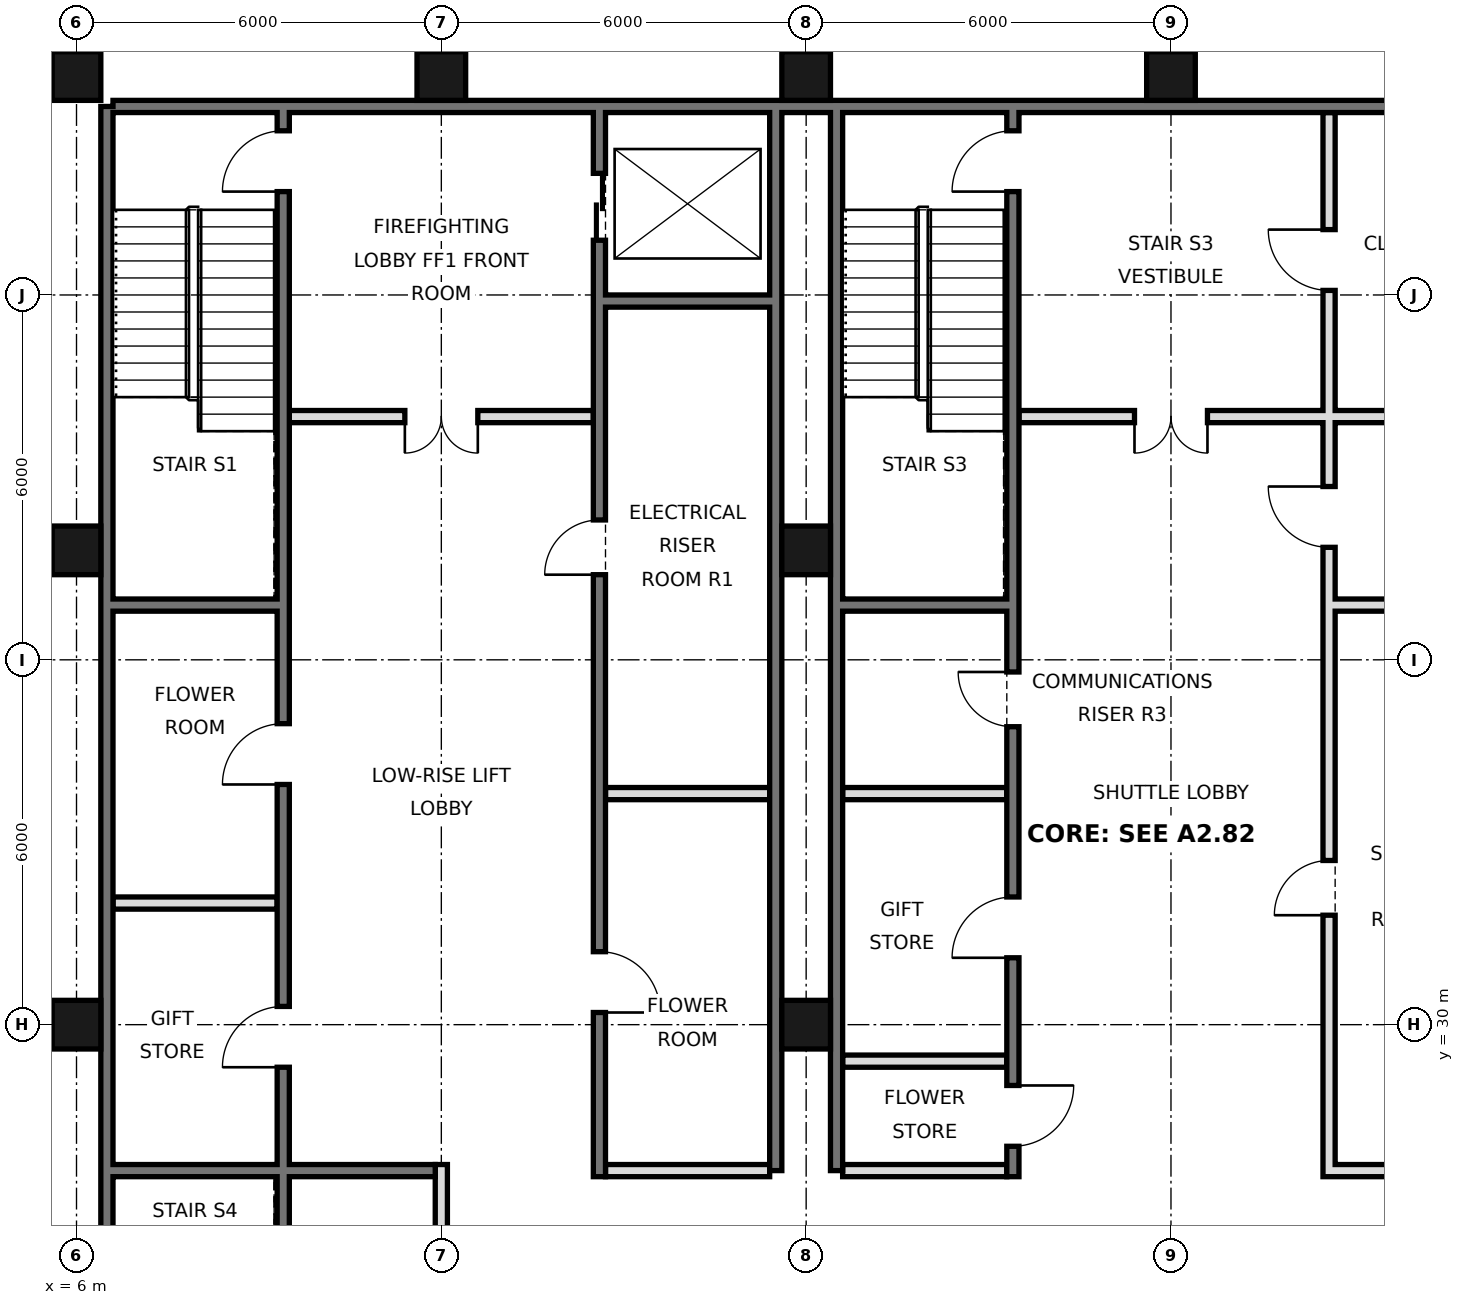
"""IFC4 building model, lengths in metres.
Left out: names, types, materials, properties, quantities, classifications, styles, units other than length and angle.
Written with IfcOpenShell. Run it as: python <this file> out.ifc"""

import sys

from ifc_helpers import new_model, si_unit, direction, frame, frame_2d, origin, origin_2d, place, context, subcontext, project, spatial, rectangle, hollow_rectangle, extrude, element, fill, save


model = new_model("IFC4")
c1 = context("Model", 3, precision=1e-05, world=origin(), true_north=direction((0.0, 1.0)))
c2 = subcontext(c1, "Body", "Model", "MODEL_VIEW")
j1 = project(units=[si_unit("LENGTHUNIT", "METRE"), si_unit("PLANEANGLEUNIT", "RADIAN")], contexts=[c1])
p1 = place(None, origin())
s1 = spatial("IfcSite", under=j1, at=p1, CompositionType="ELEMENT")
p2 = place(p1, origin())
s2 = spatial("IfcBuilding", under=s1, at=p2, CompositionType="ELEMENT")
p3 = place(p2, frame((0.0, 0.0, 326.8)))
s3 = spatial("IfcBuildingStorey", under=s2, at=p3, CompositionType="ELEMENT", Elevation=326.8)
for number, where, z_axis, x_axis in (
    (1, (6.0, 30.0, 0.0), (0.0, 0.0, 1.0), (1.0, 0.0, 0.0)),
    (2, (6.0, 37.8, 0.0), (0.0, 0.0, 1.0), (1.0, 0.0, 0.0)),
    (3, (6.0, 45.6, 0.0), (0.0, 0.0, 1.0), (1.0, 0.0, 0.0)),
    (4, (12.0, 45.6, 0.0), (0.0, 0.0, 1.0), (1.0, 0.0, 0.0)),
    (5, (18.0, 30.0, 0.0), (0.0, 0.0, 1.0), (1.0, 0.0, 0.0)),
    (6, (18.0, 37.8, 0.0), (0.0, 0.0, 1.0), (1.0, 0.0, 0.0)),
    (7, (18.0, 45.6, 0.0), (0.0, 0.0, 1.0), (1.0, 0.0, 0.0)),
    (8, (24.0, 45.6, 0.0), (0.0, 0.0, 1.0), (1.0, 0.0, 0.0)),
):
    element("IfcColumn", number, at=place(p3, frame(where, z_axis=z_axis, x_axis=x_axis)), inside=s3, PredefinedType="COLUMN", context=c2, shape_type="SweptSolid", body=[
        extrude(hollow_rectangle(XDim=0.8, YDim=0.8, WallThickness=0.025, at=origin_2d()), origin(), (0.0, 0.0, 1.0), 4.4),
    ])
p4 = place(p3, frame((6.5, 21.6, 0.0), z_axis=(0.0, 0.0, 1.0), x_axis=(0.0, 1.0, 0.0)))
e9 = element("IfcWall", 9, at=p4, inside=s3, PredefinedType="SOLIDWALL", context=c2, shape_type="SweptSolid", body=[
    extrude(rectangle(XDim=23.5, YDim=0.2, at=frame_2d((11.75, 0.0))), origin(), (0.0, 0.0, 1.0), 4.1),
])
p5 = place(p3, frame((6.6, 45.1, 0.0), z_axis=(0.0, 0.0, 1.0), x_axis=(1.0, 0.0, 0.0)))
e10 = element("IfcWall", 10, at=p5, inside=s3, PredefinedType="SOLIDWALL", context=c2, shape_type="SweptSolid", body=[
    extrude(rectangle(XDim=34.8, YDim=0.2, at=frame_2d((17.4, 0.0))), origin(), (0.0, 0.0, 1.0), 4.1),
])
for number, where, z_axis, x_axis in (
    (11, (17.5, 27.6, 0.0), (0.0, 0.0, 1.0), (0.0, 1.0, 0.0)),
    (12, (18.5, 27.6, 0.0), (0.0, 0.0, 1.0), (0.0, 1.0, 0.0)),
):
    element("IfcWall", number, at=place(p3, frame(where, z_axis=z_axis, x_axis=x_axis)), inside=s3, PredefinedType="SOLIDWALL", context=c2, shape_type="SweptSolid", body=[
        extrude(rectangle(XDim=17.5, YDim=0.2, at=frame_2d((8.75, 0.0))), origin(), (0.0, 0.0, 1.0), 4.1),
    ])
p6 = place(p3, frame((12.0, 21.6, 0.0), z_axis=(0.0, 0.0, 1.0), x_axis=(0.0, 1.0, 0.0)))
e13 = element("IfcWall", 13, at=p6, inside=s3, PredefinedType="PARTITIONING", context=c2, shape_type="SweptSolid", body=[
    extrude(rectangle(XDim=6.1, YDim=0.2, at=frame_2d((3.05, 0.0))), origin(), (0.0, 0.0, 1.0), 4.1),
])
p7 = place(p3, frame((14.6, 27.5, 0.0), z_axis=(0.0, 0.0, 1.0), x_axis=(0.0, 1.0, 0.0)))
e14 = element("IfcWall", 14, at=p7, inside=s3, PredefinedType="SOLIDWALL", context=c2, shape_type="SweptSolid", body=[
    extrude(rectangle(XDim=17.5, YDim=0.2, at=frame_2d((8.75, 0.0))), origin(), (0.0, 0.0, 1.0), 4.1),
])
p8 = place(p7, frame((15.4, 0.0, 0.0)))
e15 = element("IfcOpeningElement", 15, at=p8, cuts=e14, PredefinedType="OPENING", context=c2, shape_type="SweptSolid", body=[
    extrude(rectangle(XDim=1.1, YDim=2.1, at=frame_2d((0.55, 1.05))), frame((0.0, 0.11, 0.0), z_axis=(0.0, -1.0, 0.0), x_axis=(1.0, 0.0, 0.0)), (0.0, 0.0, 1.0), 0.22),
])
p9 = place(p7, frame((2.7, 0.0, 0.0)))
e16 = element("IfcOpeningElement", 16, at=p9, cuts=e14, PredefinedType="OPENING", context=c2, shape_type="SweptSolid", body=[
    extrude(rectangle(XDim=1.0, YDim=2.1, at=frame_2d((0.5, 1.05))), frame((0.0, 0.11, 0.0), z_axis=(0.0, -1.0, 0.0), x_axis=(1.0, 0.0, 0.0)), (0.0, 0.0, 1.0), 0.22),
])
p10 = place(p7, frame((9.9, 0.0, 0.0)))
e17 = element("IfcOpeningElement", 17, at=p10, cuts=e14, PredefinedType="OPENING", context=c2, shape_type="SweptSolid", body=[
    extrude(rectangle(XDim=0.9, YDim=2.1, at=frame_2d((0.45, 1.05))), frame((0.0, 0.11, 0.0), z_axis=(0.0, -1.0, 0.0), x_axis=(1.0, 0.0, 0.0)), (0.0, 0.0, 1.0), 0.22),
])
p11 = place(p3, frame((21.4, 27.5, 0.0), z_axis=(0.0, 0.0, 1.0), x_axis=(0.0, 1.0, 0.0)))
e18 = element("IfcWall", 18, at=p11, inside=s3, PredefinedType="SOLIDWALL", context=c2, shape_type="SweptSolid", body=[
    extrude(rectangle(XDim=17.5, YDim=0.2, at=frame_2d((8.75, 0.0))), origin(), (0.0, 0.0, 1.0), 4.1),
])
p12 = place(p11, frame((0.5, 0.0, 0.0)))
e19 = element("IfcOpeningElement", 19, at=p12, cuts=e18, PredefinedType="OPENING", context=c2, shape_type="SweptSolid", body=[
    extrude(rectangle(XDim=1.0, YDim=2.1, at=frame_2d((0.5, 1.05))), frame((0.0, 0.11, 0.0), z_axis=(0.0, -1.0, 0.0), x_axis=(1.0, 0.0, 0.0)), (0.0, 0.0, 1.0), 0.22),
])
p13 = place(p11, frame((3.6, 0.0, 0.0)))
e20 = element("IfcOpeningElement", 20, at=p13, cuts=e18, PredefinedType="OPENING", context=c2, shape_type="SweptSolid", body=[
    extrude(rectangle(XDim=1.0, YDim=2.1, at=frame_2d((0.5, 1.05))), frame((0.0, 0.11, 0.0), z_axis=(0.0, -1.0, 0.0), x_axis=(1.0, 0.0, 0.0)), (0.0, 0.0, 1.0), 0.22),
])
p14 = place(p11, frame((16.2, 0.0, 0.0)))
e21 = element("IfcOpeningElement", 21, at=p14, cuts=e18, PredefinedType="OPENING", context=c2, shape_type="SweptSolid", body=[
    extrude(rectangle(XDim=1.0, YDim=2.1, at=frame_2d((0.5, 1.05))), frame((0.0, 0.11, 0.0), z_axis=(0.0, -1.0, 0.0), x_axis=(1.0, 0.0, 0.0)), (0.0, 0.0, 1.0), 0.22),
])
p15 = place(p11, frame((7.4, 0.0, 0.0)))
e22 = element("IfcOpeningElement", 22, at=p15, cuts=e18, PredefinedType="OPENING", context=c2, shape_type="SweptSolid", body=[
    extrude(rectangle(XDim=0.9, YDim=2.1, at=frame_2d((0.45, 1.05))), frame((0.0, 0.11, 0.0), z_axis=(0.0, -1.0, 0.0), x_axis=(1.0, 0.0, 0.0)), (0.0, 0.0, 1.0), 0.22),
])
p16 = place(p3, frame((26.6, 27.5, 0.0), z_axis=(0.0, 0.0, 1.0), x_axis=(0.0, 1.0, 0.0)))
e23 = element("IfcWall", 23, at=p16, inside=s3, PredefinedType="SOLIDWALL", context=c2, shape_type="SweptSolid", body=[
    extrude(rectangle(XDim=17.5, YDim=0.2, at=frame_2d((8.75, 0.0))), origin(), (0.0, 0.0, 1.0), 4.1),
])
p17 = place(p16, frame((4.3, 0.0, 0.0)))
e24 = element("IfcOpeningElement", 24, at=p17, cuts=e23, PredefinedType="OPENING", context=c2, shape_type="SweptSolid", body=[
    extrude(rectangle(XDim=0.9, YDim=2.1, at=frame_2d((0.45, 1.05))), frame((0.0, 0.11, 0.0), z_axis=(0.0, -1.0, 0.0), x_axis=(1.0, 0.0, 0.0)), (0.0, 0.0, 1.0), 0.22),
])
p18 = place(p16, frame((10.35, 0.0, 0.0)))
e25 = element("IfcOpeningElement", 25, at=p18, cuts=e23, PredefinedType="OPENING", context=c2, shape_type="SweptSolid", body=[
    extrude(rectangle(XDim=1.0, YDim=2.1, at=frame_2d((0.5, 1.05))), frame((0.0, 0.11, 0.0), z_axis=(0.0, -1.0, 0.0), x_axis=(1.0, 0.0, 0.0)), (0.0, 0.0, 1.0), 0.22),
])
p19 = place(p16, frame((14.575, 0.0, 0.0)))
e26 = element("IfcOpeningElement", 26, at=p19, cuts=e23, PredefinedType="OPENING", context=c2, shape_type="SweptSolid", body=[
    extrude(rectangle(XDim=1.0, YDim=2.1, at=frame_2d((0.5, 1.05))), frame((0.0, 0.11, 0.0), z_axis=(0.0, -1.0, 0.0), x_axis=(1.0, 0.0, 0.0)), (0.0, 0.0, 1.0), 0.22),
])
p20 = place(p3, frame((9.4, 21.6, 0.0), z_axis=(0.0, 0.0, 1.0), x_axis=(0.0, 1.0, 0.0)))
e27 = element("IfcWall", 27, at=p20, inside=s3, PredefinedType="SOLIDWALL", context=c2, shape_type="SweptSolid", body=[
    extrude(rectangle(XDim=23.4, YDim=0.2, at=frame_2d((11.7, 0.0))), origin(), (0.0, 0.0, 1.0), 4.1),
])
p21 = place(p20, frame((7.7, 0.0, 0.0)))
e28 = element("IfcOpeningElement", 28, at=p21, cuts=e27, PredefinedType="OPENING", context=c2, shape_type="SweptSolid", body=[
    extrude(rectangle(XDim=1.0, YDim=2.1, at=frame_2d((0.5, 1.05))), frame((0.0, 0.11, 0.0), z_axis=(0.0, -1.0, 0.0), x_axis=(1.0, 0.0, 0.0)), (0.0, 0.0, 1.0), 0.22),
])
p22 = place(p20, frame((12.35, 0.0, 0.0)))
e29 = element("IfcOpeningElement", 29, at=p22, cuts=e27, PredefinedType="OPENING", context=c2, shape_type="SweptSolid", body=[
    extrude(rectangle(XDim=1.0, YDim=2.1, at=frame_2d((0.5, 1.05))), frame((0.0, 0.11, 0.0), z_axis=(0.0, -1.0, 0.0), x_axis=(1.0, 0.0, 0.0)), (0.0, 0.0, 1.0), 0.22),
])
p23 = place(p20, frame((22.1, 0.0, 0.0)))
e30 = element("IfcOpeningElement", 30, at=p23, cuts=e27, PredefinedType="OPENING", context=c2, shape_type="SweptSolid", body=[
    extrude(rectangle(XDim=1.0, YDim=2.1, at=frame_2d((0.5, 1.05))), frame((0.0, 0.11, 0.0), z_axis=(0.0, -1.0, 0.0), x_axis=(1.0, 0.0, 0.0)), (0.0, 0.0, 1.0), 0.22),
])
p24 = place(p20, frame((0.175, 0.0, 0.0)))
e31 = element("IfcOpeningElement", 31, at=p24, cuts=e27, PredefinedType="OPENING", context=c2, shape_type="SweptSolid", body=[
    extrude(rectangle(XDim=0.9, YDim=2.1, at=frame_2d((0.45, 1.05))), frame((0.0, 0.11, 0.0), z_axis=(0.0, -1.0, 0.0), x_axis=(1.0, 0.0, 0.0)), (0.0, 0.0, 1.0), 0.22),
])
for number, where, z_axis, x_axis in (
    (32, (14.7, 27.6, 0.0), (0.0, 0.0, 1.0), (1.0, 0.0, 0.0)),
    (33, (18.6, 27.6, 0.0), (0.0, 0.0, 1.0), (1.0, 0.0, 0.0)),
):
    element("IfcWall", number, at=place(p3, frame(where, z_axis=z_axis, x_axis=x_axis)), inside=s3, PredefinedType="PARTITIONING", context=c2, shape_type="SweptSolid", body=[
        extrude(rectangle(XDim=2.7, YDim=0.2, at=frame_2d((1.35, 0.0))), origin(), (0.0, 0.0, 1.0), 4.1),
    ])
p25 = place(p3, frame((26.7, 27.6, 0.0), z_axis=(0.0, 0.0, 1.0), x_axis=(1.0, 0.0, 0.0)))
e34 = element("IfcWall", 34, at=p25, inside=s3, PredefinedType="SOLIDWALL", context=c2, shape_type="SweptSolid", body=[
    extrude(rectangle(XDim=2.7, YDim=0.2, at=frame_2d((1.35, 0.0))), origin(), (0.0, 0.0, 1.0), 4.1),
])
p26 = place(p3, frame((6.6, 27.6, 0.0), z_axis=(0.0, 0.0, 1.0), x_axis=(1.0, 0.0, 0.0)))
e35 = element("IfcWall", 35, at=p26, inside=s3, PredefinedType="SOLIDWALL", context=c2, shape_type="SweptSolid", body=[
    extrude(rectangle(XDim=5.3, YDim=0.2, at=frame_2d((2.65, 0.0))), origin(), (0.0, 0.0, 1.0), 4.1),
])
for number, where, z_axis, x_axis in (
    (36, (18.6, 29.4, 0.0), (0.0, 0.0, 1.0), (1.0, 0.0, 0.0)),
    (37, (6.6, 32.0, 0.0), (0.0, 0.0, 1.0), (1.0, 0.0, 0.0)),
):
    element("IfcWall", number, at=place(p3, frame(where, z_axis=z_axis, x_axis=x_axis)), inside=s3, PredefinedType="PARTITIONING", context=c2, shape_type="SweptSolid", body=[
        extrude(rectangle(XDim=2.7, YDim=0.2, at=frame_2d((1.35, 0.0))), origin(), (0.0, 0.0, 1.0), 4.1),
    ])
for number, where, z_axis, x_axis in (
    (38, (14.7, 33.8, 0.0), (0.0, 0.0, 1.0), (1.0, 0.0, 0.0)),
    (39, (18.6, 33.8, 0.0), (0.0, 0.0, 1.0), (1.0, 0.0, 0.0)),
    (40, (18.6, 36.9, 0.0), (0.0, 0.0, 1.0), (1.0, 0.0, 0.0)),
    (41, (26.7, 36.9, 0.0), (0.0, 0.0, 1.0), (1.0, 0.0, 0.0)),
    (42, (6.6, 36.9, 0.0), (0.0, 0.0, 1.0), (1.0, 0.0, 0.0)),
):
    element("IfcWall", number, at=place(p3, frame(where, z_axis=z_axis, x_axis=x_axis)), inside=s3, PredefinedType="SOLIDWALL", context=c2, shape_type="SweptSolid", body=[
        extrude(rectangle(XDim=2.7, YDim=0.2, at=frame_2d((1.35, 0.0))), origin(), (0.0, 0.0, 1.0), 4.1),
    ])
p27 = place(p3, frame((21.5, 40.0, 0.0), z_axis=(0.0, 0.0, 1.0), x_axis=(1.0, 0.0, 0.0)))
e43 = element("IfcWall", 43, at=p27, inside=s3, PredefinedType="PARTITIONING", context=c2, shape_type="SweptSolid", body=[
    extrude(rectangle(XDim=7.9, YDim=0.2, at=frame_2d((3.95, 0.0))), origin(), (0.0, 0.0, 1.0), 4.1),
])
p28 = place(p27, frame((1.9, 0.0, 0.0)))
e44 = element("IfcOpeningElement", 44, at=p28, cuts=e43, PredefinedType="OPENING", context=c2, shape_type="SweptSolid", body=[
    extrude(rectangle(XDim=1.2, YDim=2.1, at=frame_2d((0.6, 1.05))), frame((0.0, 0.11, 0.0), z_axis=(0.0, -1.0, 0.0), x_axis=(1.0, 0.0, 0.0)), (0.0, 0.0, 1.0), 0.22),
])
p29 = place(p3, frame((9.5, 40.0, 0.0), z_axis=(0.0, 0.0, 1.0), x_axis=(1.0, 0.0, 0.0)))
e45 = element("IfcWall", 45, at=p29, inside=s3, PredefinedType="PARTITIONING", context=c2, shape_type="SweptSolid", body=[
    extrude(rectangle(XDim=5.0, YDim=0.2, at=frame_2d((2.5, 0.0))), origin(), (0.0, 0.0, 1.0), 4.1),
])
p30 = place(p29, frame((1.9, 0.0, 0.0)))
e46 = element("IfcOpeningElement", 46, at=p30, cuts=e45, PredefinedType="OPENING", context=c2, shape_type="SweptSolid", body=[
    extrude(rectangle(XDim=1.2, YDim=2.1, at=frame_2d((0.6, 1.05))), frame((0.0, 0.11, 0.0), z_axis=(0.0, -1.0, 0.0), x_axis=(1.0, 0.0, 0.0)), (0.0, 0.0, 1.0), 0.22),
])
p31 = place(p3, frame((14.7, 41.9, 0.0), z_axis=(0.0, 0.0, 1.0), x_axis=(1.0, 0.0, 0.0)))
e47 = element("IfcWall", 47, at=p31, inside=s3, PredefinedType="SOLIDWALL", context=c2, shape_type="SweptSolid", body=[
    extrude(rectangle(XDim=2.7, YDim=0.2, at=frame_2d((1.35, 0.0))), origin(), (0.0, 0.0, 1.0), 4.1),
])
p32 = place(p30, frame((1.2, 0.0, 0.0), z_axis=(0.0, 0.0, 1.0), x_axis=(-1.0, 0.0, 0.0)))
e48 = element("IfcDoor", 48, at=p32, inside=s3, OperationType="DOUBLE_DOOR_SINGLE_SWING", PredefinedType="DOOR", context=c2, shape_type="SweptSolid", body=[
    extrude(rectangle(XDim=1.2, YDim=2.1, at=frame_2d((0.6, 1.05))), frame((0.0, 0.025, 0.0), z_axis=(0.0, -1.0, 0.0), x_axis=(1.0, 0.0, 0.0)), (0.0, 0.0, 1.0), 0.05),
])
fill(e46, e48)
p33 = place(p28, frame((1.2, 0.0, 0.0), z_axis=(0.0, 0.0, 1.0), x_axis=(-1.0, 0.0, 0.0)))
e49 = element("IfcDoor", 49, at=p33, inside=s3, OperationType="DOUBLE_DOOR_SINGLE_SWING", PredefinedType="DOOR", context=c2, shape_type="SweptSolid", body=[
    extrude(rectangle(XDim=1.2, YDim=2.1, at=frame_2d((0.6, 1.05))), frame((0.0, 0.025, 0.0), z_axis=(0.0, -1.0, 0.0), x_axis=(1.0, 0.0, 0.0)), (0.0, 0.0, 1.0), 0.05),
])
fill(e44, e49)
p34 = place(p8, origin())
e50 = element("IfcDoor", 50, at=p34, inside=s3, OperationType="DOUBLE_DOOR_SLIDING", PredefinedType="DOOR", context=c2, shape_type="SweptSolid", body=[
    extrude(rectangle(XDim=1.1, YDim=2.1, at=frame_2d((0.55, 1.05))), frame((0.0, 0.025, 0.0), z_axis=(0.0, -1.0, 0.0), x_axis=(1.0, 0.0, 0.0)), (0.0, 0.0, 1.0), 0.05),
])
fill(e15, e50)
p35 = place(p12, origin())
e51 = element("IfcDoor", 51, at=p35, inside=s3, OperationType="SINGLE_SWING_RIGHT", PredefinedType="DOOR", context=c2, shape_type="SweptSolid", body=[
    extrude(rectangle(XDim=1.0, YDim=2.1, at=frame_2d((0.5, 1.05))), frame((0.0, 0.025, 0.0), z_axis=(0.0, -1.0, 0.0), x_axis=(1.0, 0.0, 0.0)), (0.0, 0.0, 1.0), 0.05),
])
fill(e19, e51)
p36 = place(p13, origin())
e52 = element("IfcDoor", 52, at=p36, inside=s3, OperationType="SINGLE_SWING_LEFT", PredefinedType="DOOR", context=c2, shape_type="SweptSolid", body=[
    extrude(rectangle(XDim=1.0, YDim=2.1, at=frame_2d((0.5, 1.05))), frame((0.0, 0.025, 0.0), z_axis=(0.0, -1.0, 0.0), x_axis=(1.0, 0.0, 0.0)), (0.0, 0.0, 1.0), 0.05),
])
fill(e20, e52)
p37 = place(p9, frame((1.0, 0.0, 0.0), z_axis=(0.0, 0.0, 1.0), x_axis=(-1.0, 0.0, 0.0)))
e53 = element("IfcDoor", 53, at=p37, inside=s3, OperationType="SINGLE_SWING_RIGHT", PredefinedType="DOOR", context=c2, shape_type="SweptSolid", body=[
    extrude(rectangle(XDim=1.0, YDim=2.1, at=frame_2d((0.5, 1.05))), frame((0.0, 0.025, 0.0), z_axis=(0.0, -1.0, 0.0), x_axis=(1.0, 0.0, 0.0)), (0.0, 0.0, 1.0), 0.05),
])
fill(e16, e53)
p38 = place(p21, origin())
e54 = element("IfcDoor", 54, at=p38, inside=s3, OperationType="SINGLE_SWING_LEFT", PredefinedType="DOOR", context=c2, shape_type="SweptSolid", body=[
    extrude(rectangle(XDim=1.0, YDim=2.1, at=frame_2d((0.5, 1.05))), frame((0.0, 0.025, 0.0), z_axis=(0.0, -1.0, 0.0), x_axis=(1.0, 0.0, 0.0)), (0.0, 0.0, 1.0), 0.05),
])
fill(e28, e54)
p39 = place(p22, origin())
e55 = element("IfcDoor", 55, at=p39, inside=s3, OperationType="SINGLE_SWING_LEFT", PredefinedType="DOOR", context=c2, shape_type="SweptSolid", body=[
    extrude(rectangle(XDim=1.0, YDim=2.1, at=frame_2d((0.5, 1.05))), frame((0.0, 0.025, 0.0), z_axis=(0.0, -1.0, 0.0), x_axis=(1.0, 0.0, 0.0)), (0.0, 0.0, 1.0), 0.05),
])
fill(e29, e55)
p40 = place(p23, origin())
e56 = element("IfcDoor", 56, at=p40, inside=s3, OperationType="SINGLE_SWING_LEFT", PredefinedType="DOOR", context=c2, shape_type="SweptSolid", body=[
    extrude(rectangle(XDim=1.0, YDim=2.1, at=frame_2d((0.5, 1.05))), frame((0.0, 0.025, 0.0), z_axis=(0.0, -1.0, 0.0), x_axis=(1.0, 0.0, 0.0)), (0.0, 0.0, 1.0), 0.05),
])
fill(e30, e56)
p41 = place(p14, origin())
e57 = element("IfcDoor", 57, at=p41, inside=s3, OperationType="SINGLE_SWING_LEFT", PredefinedType="DOOR", context=c2, shape_type="SweptSolid", body=[
    extrude(rectangle(XDim=1.0, YDim=2.1, at=frame_2d((0.5, 1.05))), frame((0.0, 0.025, 0.0), z_axis=(0.0, -1.0, 0.0), x_axis=(1.0, 0.0, 0.0)), (0.0, 0.0, 1.0), 0.05),
])
fill(e21, e57)
p42 = place(p10, origin())
e58 = element("IfcDoor", 58, at=p42, inside=s3, OperationType="SINGLE_SWING_LEFT", PredefinedType="DOOR", context=c2, shape_type="SweptSolid", body=[
    extrude(rectangle(XDim=0.9, YDim=2.1, at=frame_2d((0.45, 1.05))), frame((0.0, 0.025, 0.0), z_axis=(0.0, -1.0, 0.0), x_axis=(1.0, 0.0, 0.0)), (0.0, 0.0, 1.0), 0.05),
])
fill(e17, e58)
p43 = place(p15, frame((0.9, 0.0, 0.0), z_axis=(0.0, 0.0, 1.0), x_axis=(-1.0, 0.0, 0.0)))
e59 = element("IfcDoor", 59, at=p43, inside=s3, OperationType="SINGLE_SWING_LEFT", PredefinedType="DOOR", context=c2, shape_type="SweptSolid", body=[
    extrude(rectangle(XDim=0.9, YDim=2.1, at=frame_2d((0.45, 1.05))), frame((0.0, 0.025, 0.0), z_axis=(0.0, -1.0, 0.0), x_axis=(1.0, 0.0, 0.0)), (0.0, 0.0, 1.0), 0.05),
])
fill(e22, e59)
p44 = place(p17, origin())
e60 = element("IfcDoor", 60, at=p44, inside=s3, OperationType="SINGLE_SWING_LEFT", PredefinedType="DOOR", context=c2, shape_type="SweptSolid", body=[
    extrude(rectangle(XDim=0.9, YDim=2.1, at=frame_2d((0.45, 1.05))), frame((0.0, 0.025, 0.0), z_axis=(0.0, -1.0, 0.0), x_axis=(1.0, 0.0, 0.0)), (0.0, 0.0, 1.0), 0.05),
])
fill(e24, e60)
p45 = place(p18, frame((1.0, 0.0, 0.0), z_axis=(0.0, 0.0, 1.0), x_axis=(-1.0, 0.0, 0.0)))
e61 = element("IfcDoor", 61, at=p45, inside=s3, OperationType="SINGLE_SWING_LEFT", PredefinedType="DOOR", context=c2, shape_type="SweptSolid", body=[
    extrude(rectangle(XDim=1.0, YDim=2.1, at=frame_2d((0.5, 1.05))), frame((0.0, 0.025, 0.0), z_axis=(0.0, -1.0, 0.0), x_axis=(1.0, 0.0, 0.0)), (0.0, 0.0, 1.0), 0.05),
])
fill(e25, e61)
p46 = place(p19, frame((1.0, 0.0, 0.0), z_axis=(0.0, 0.0, 1.0), x_axis=(-1.0, 0.0, 0.0)))
e62 = element("IfcDoor", 62, at=p46, inside=s3, OperationType="SINGLE_SWING_LEFT", PredefinedType="DOOR", context=c2, shape_type="SweptSolid", body=[
    extrude(rectangle(XDim=1.0, YDim=2.1, at=frame_2d((0.5, 1.05))), frame((0.0, 0.025, 0.0), z_axis=(0.0, -1.0, 0.0), x_axis=(1.0, 0.0, 0.0)), (0.0, 0.0, 1.0), 0.05),
])
fill(e26, e62)
save(model, sys.argv[1])
